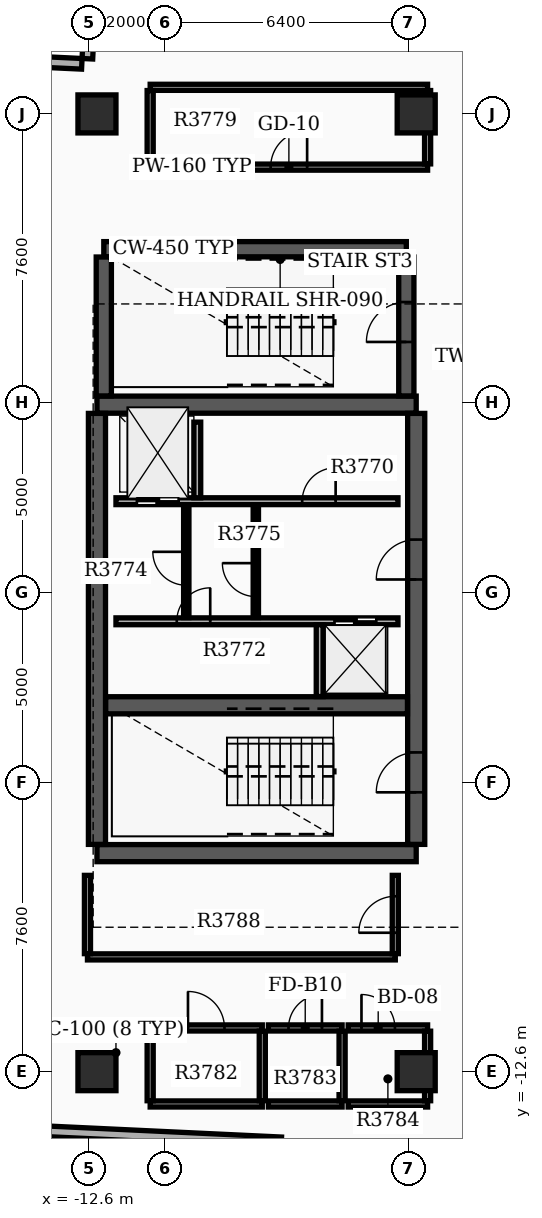
"""IFC4 building model, lengths in metres.
Left out: names, types, materials, properties, quantities, classifications, styles, units other than length and angle.
Written with IfcOpenShell. Run it as: python <this file> out.ifc"""

import sys

from ifc_helpers import new_model, si_unit, direction, frame, frame_2d, origin, origin_2d, place, context, subcontext, project, spatial, rectangle, extrude, element, fill, save


model = new_model("IFC4")
c1 = context("Model", 3, precision=1e-05, world=origin(), true_north=direction((0.0, 1.0)))
c2 = subcontext(c1, "Body", "Model", "MODEL_VIEW")
j1 = project(units=[si_unit("LENGTHUNIT", "METRE"), si_unit("PLANEANGLEUNIT", "RADIAN")], contexts=[c1])
p1 = place(None, origin())
s1 = spatial("IfcSite", under=j1, at=p1, CompositionType="ELEMENT")
p2 = place(p1, origin())
s2 = spatial("IfcBuilding", under=s1, at=p2, CompositionType="ELEMENT")
p3 = place(p2, frame((0.0, 0.0, 236.4)))
s3 = spatial("IfcBuildingStorey", under=s2, at=p3, CompositionType="ELEMENT", Elevation=236.4)
for number, where, z_axis, x_axis in (
    (1, (-12.4, -6.85, 0.0), (0.0, 0.0, 1.0), (1.0, 0.0, 0.0)),
    (2, (-12.4, 4.95, 0.0), (0.0, 0.0, 1.0), (1.0, 0.0, 0.0)),
):
    element("IfcWall", number, at=place(p3, frame(where, z_axis=z_axis, x_axis=x_axis)), inside=s3, PredefinedType="SHEAR", context=c2, shape_type="SweptSolid", body=[
        extrude(rectangle(XDim=8.4, YDim=0.45, at=frame_2d((4.2, 0.0))), origin(), (0.0, 0.0, 1.0), 3.65),
    ])
p4 = place(p3, frame((-12.4, -6.62, 0.0), z_axis=(0.0, 0.0, 1.0), x_axis=(0.0, 1.0, 0.0)))
e3 = element("IfcWall", 3, at=p4, inside=s3, PredefinedType="SHEAR", context=c2, shape_type="SweptSolid", body=[
    extrude(rectangle(XDim=11.34, YDim=0.45, at=frame_2d((5.67, 0.0))), origin(), (0.0, 0.0, 1.0), 3.65),
])
p5 = place(p3, frame((-4.0, -6.62, 0.0), z_axis=(0.0, 0.0, 1.0), x_axis=(0.0, 1.0, 0.0)))
e4 = element("IfcWall", 4, at=p5, inside=s3, PredefinedType="SHEAR", context=c2, shape_type="SweptSolid", body=[
    extrude(rectangle(XDim=11.34, YDim=0.45, at=frame_2d((5.67, 0.0))), origin(), (0.0, 0.0, 1.0), 3.65),
])
p6 = place(p5, frame((1.37, 0.0, 0.0)))
e5 = element("IfcOpeningElement", 5, at=p6, cuts=e4, PredefinedType="OPENING", context=c2, shape_type="SweptSolid", body=[
    extrude(rectangle(XDim=1.05, YDim=2.15, at=frame_2d((0.525, 1.075))), frame((0.0, 0.235, 0.0), z_axis=(0.0, -1.0, 0.0), x_axis=(1.0, 0.0, 0.0)), (0.0, 0.0, 1.0), 0.47),
])
p7 = place(p5, frame((6.97, 0.0, 0.0)))
e6 = element("IfcOpeningElement", 6, at=p7, cuts=e4, PredefinedType="OPENING", context=c2, shape_type="SweptSolid", body=[
    extrude(rectangle(XDim=1.05, YDim=2.15, at=frame_2d((0.525, 1.075))), frame((0.0, 0.235, 0.0), z_axis=(0.0, -1.0, 0.0), x_axis=(1.0, 0.0, 0.0)), (0.0, 0.0, 1.0), 0.47),
])
p8 = place(p3, frame((-12.17, -2.96, 0.0), z_axis=(0.0, 0.0, 1.0), x_axis=(1.0, 0.0, 0.0)))
e7 = element("IfcWall", 7, at=p8, inside=s3, PredefinedType="SHEAR", context=c2, shape_type="SweptSolid", body=[
    extrude(rectangle(XDim=7.94, YDim=0.45, at=frame_2d((3.97, 0.0))), origin(), (0.0, 0.0, 1.0), 3.65),
])
p9 = place(p3, frame((-12.22, 9.04, 0.0), z_axis=(0.0, 0.0, 1.0), x_axis=(1.0, 0.0, 0.0)))
e8 = element("IfcWall", 8, at=p9, inside=s3, PredefinedType="SHEAR", context=c2, shape_type="SweptSolid", body=[
    extrude(rectangle(XDim=7.96, YDim=0.4, at=frame_2d((3.98, 0.0))), origin(), (0.0, 0.0, 1.0), 3.65),
])
p10 = place(p3, frame((-12.22, 5.18, 0.0), z_axis=(0.0, 0.0, 1.0), x_axis=(0.0, 1.0, 0.0)))
e9 = element("IfcWall", 9, at=p10, inside=s3, PredefinedType="SHEAR", context=c2, shape_type="SweptSolid", body=[
    extrude(rectangle(XDim=3.655, YDim=0.4, at=frame_2d((1.828, 0.0))), origin(), (0.0, 0.0, 1.0), 3.65),
])
p11 = place(p3, frame((-4.26, 5.18, 0.0), z_axis=(0.0, 0.0, 1.0), x_axis=(0.0, 1.0, 0.0)))
e10 = element("IfcWall", 10, at=p11, inside=s3, PredefinedType="SHEAR", context=c2, shape_type="SweptSolid", body=[
    extrude(rectangle(XDim=3.655, YDim=0.4, at=frame_2d((1.828, 0.0))), origin(), (0.0, 0.0, 1.0), 3.65),
])
p12 = place(p11, frame((1.42, 0.0, 0.0)))
e11 = element("IfcOpeningElement", 11, at=p12, cuts=e10, PredefinedType="OPENING", context=c2, shape_type="SweptSolid", body=[
    extrude(rectangle(XDim=1.05, YDim=2.15, at=frame_2d((0.525, 1.075))), frame((0.0, 0.21, 0.0), z_axis=(0.0, -1.0, 0.0), x_axis=(1.0, 0.0, 0.0)), (0.0, 0.0, 1.0), 0.42),
])
for number, where, z_axis, x_axis in (
    (12, (-12.4, -12.6, 0.0), (0.0, 0.0, 1.0), (1.0, 0.0, 0.0)),
    (13, (-12.4, 12.6, 0.0), (0.0, 0.0, 1.0), (1.0, 0.0, 0.0)),
    (14, (-4.0, -12.6, 0.0), (0.0, 0.0, 1.0), (1.0, 0.0, 0.0)),
    (15, (-4.0, 12.6, 0.0), (0.0, 0.0, 1.0), (1.0, 0.0, 0.0)),
):
    element("IfcColumn", number, at=place(p3, frame(where, z_axis=z_axis, x_axis=x_axis)), inside=s3, PredefinedType="COLUMN", context=c2, shape_type="SweptSolid", body=[
        extrude(rectangle(XDim=1.0, YDim=1.0, at=origin_2d()), origin(), (0.0, 0.0, 1.0), 3.9),
    ])
p13 = place(p3, frame((-14.017, 13.976, 0.0), z_axis=(0.0, 0.0, 1.0), x_axis=(0.998883930236, -0.047232339719, 0.0)))
e16 = element("IfcWall", 16, at=p13, inside=s3, PredefinedType="STANDARD", context=c2, shape_type="SweptSolid", body=[
    extrude(rectangle(XDim=1.22, YDim=0.28, at=frame_2d((0.61, 0.0))), origin(), (0.0, 0.0, 1.0), 3.13),
])
p14 = place(p3, frame((-12.652, 14.052, 0.0), z_axis=(0.0, 0.0, 1.0), x_axis=(0.047039284441, 0.99889304018, 0.0)))
e17 = element("IfcWall", 17, at=p14, inside=s3, PredefinedType="STANDARD", context=c2, shape_type="SweptSolid", body=[
    extrude(rectangle(XDim=1.5, YDim=0.28, at=frame_2d((0.75, 0.0))), origin(), (0.0, 0.0, 1.0), 3.13),
])
p15 = place(p3, frame((-13.843, -14.164, 0.0), z_axis=(0.0, 0.0, 1.0), x_axis=(0.998889082162, -0.047123258997, 0.0)))
e18 = element("IfcWall", 18, at=p15, inside=s3, PredefinedType="STANDARD", context=c2, shape_type="SweptSolid", body=[
    extrude(rectangle(XDim=6.3, YDim=0.28, at=frame_2d((3.15, 0.0))), origin(), (0.0, 0.0, 1.0), 3.13),
])
p16 = place(p3, frame((-11.9, 2.41, 0.0), z_axis=(0.0, 0.0, 1.0), x_axis=(1.0, 0.0, 0.0)))
e19 = element("IfcWall", 19, at=p16, inside=s3, PredefinedType="SOLIDWALL", context=c2, shape_type="SweptSolid", body=[
    extrude(rectangle(XDim=7.42, YDim=0.18, at=frame_2d((3.71, 0.0))), origin(), (0.0, 0.0, 1.0), 3.12),
])
p17 = place(p16, frame((0.55, 0.0, 0.0)))
e20 = element("IfcOpeningElement", 20, at=p17, cuts=e19, PredefinedType="OPENING", context=c2, shape_type="SweptSolid", body=[
    extrude(rectangle(XDim=1.1, YDim=2.15, at=frame_2d((0.55, 1.075))), frame((0.0, 0.1, 0.0), z_axis=(0.0, -1.0, 0.0), x_axis=(1.0, 0.0, 0.0)), (0.0, 0.0, 1.0), 0.2),
])
p18 = place(p16, frame((4.9, 0.0, 0.0)))
e21 = element("IfcOpeningElement", 21, at=p18, cuts=e19, PredefinedType="OPENING", context=c2, shape_type="SweptSolid", body=[
    extrude(rectangle(XDim=0.88, YDim=2.1, at=frame_2d((0.44, 1.05))), frame((0.0, 0.1, 0.0), z_axis=(0.0, -1.0, 0.0), x_axis=(1.0, 0.0, 0.0)), (0.0, 0.0, 1.0), 0.2),
])
p19 = place(p3, frame((-11.9, -0.75, 0.0), z_axis=(0.0, 0.0, 1.0), x_axis=(1.0, 0.0, 0.0)))
e22 = element("IfcWall", 22, at=p19, inside=s3, PredefinedType="SOLIDWALL", context=c2, shape_type="SweptSolid", body=[
    extrude(rectangle(XDim=7.42, YDim=0.18, at=frame_2d((3.71, 0.0))), origin(), (0.0, 0.0, 1.0), 3.12),
])
p20 = place(p19, frame((5.75, 0.0, 0.0)))
e23 = element("IfcOpeningElement", 23, at=p20, cuts=e22, PredefinedType="OPENING", context=c2, shape_type="SweptSolid", body=[
    extrude(rectangle(XDim=1.1, YDim=2.15, at=frame_2d((0.55, 1.075))), frame((0.0, 0.1, 0.0), z_axis=(0.0, -1.0, 0.0), x_axis=(1.0, 0.0, 0.0)), (0.0, 0.0, 1.0), 0.2),
])
p21 = place(p19, frame((1.6, 0.0, 0.0)))
e24 = element("IfcOpeningElement", 24, at=p21, cuts=e22, PredefinedType="OPENING", context=c2, shape_type="SweptSolid", body=[
    extrude(rectangle(XDim=0.88, YDim=2.1, at=frame_2d((0.44, 1.05))), frame((0.0, 0.1, 0.0), z_axis=(0.0, -1.0, 0.0), x_axis=(1.0, 0.0, 0.0)), (0.0, 0.0, 1.0), 0.2),
])
p22 = place(p3, frame((-9.76, 2.5, 0.0), z_axis=(0.0, 0.0, 1.0), x_axis=(0.0, 1.0, 0.0)))
e25 = element("IfcWall", 25, at=p22, inside=s3, PredefinedType="SOLIDWALL", context=c2, shape_type="SweptSolid", body=[
    extrude(rectangle(XDim=1.99, YDim=0.18, at=frame_2d((0.995, 0.0))), origin(), (0.0, 0.0, 1.0), 3.12),
])
p23 = place(p3, frame((-6.54, -2.73, 0.0), z_axis=(0.0, 0.0, 1.0), x_axis=(0.0, 1.0, 0.0)))
e26 = element("IfcWall", 26, at=p23, inside=s3, PredefinedType="SOLIDWALL", context=c2, shape_type="SweptSolid", body=[
    extrude(rectangle(XDim=1.89, YDim=0.18, at=frame_2d((0.945, 0.0))), origin(), (0.0, 0.0, 1.0), 3.12),
])
p24 = place(p3, frame((-8.22, -0.65, 0.0), z_axis=(0.0, 0.0, 1.0), x_axis=(0.0, 1.0, 0.0)))
e27 = element("IfcWall", 27, at=p24, inside=s3, PredefinedType="SOLIDWALL", context=c2, shape_type="SweptSolid", body=[
    extrude(rectangle(XDim=2.96, YDim=0.14, at=frame_2d((1.48, 0.0))), origin(), (0.0, 0.0, 1.0), 3.12),
])
p25 = place(p24, frame((0.55, 0.0, 0.0)))
e28 = element("IfcOpeningElement", 28, at=p25, cuts=e27, PredefinedType="OPENING", context=c2, shape_type="SweptSolid", body=[
    extrude(rectangle(XDim=0.88, YDim=2.1, at=frame_2d((0.44, 1.05))), frame((0.0, 0.08, 0.0), z_axis=(0.0, -1.0, 0.0), x_axis=(1.0, 0.0, 0.0)), (0.0, 0.0, 1.0), 0.16),
])
p26 = place(p3, frame((-10.05, -0.652, 0.0), z_axis=(0.0, 0.0, 1.0), x_axis=(0.0, 1.0, 0.0)))
e29 = element("IfcWall", 29, at=p26, inside=s3, PredefinedType="PARTITIONING", context=c2, shape_type="SweptSolid", body=[
    extrude(rectangle(XDim=2.962, YDim=0.14, at=frame_2d((1.481, 0.0))), origin(), (0.0, 0.0, 1.0), 3.12),
])
p27 = place(p26, frame((0.85, 0.0, 0.0)))
e30 = element("IfcOpeningElement", 30, at=p27, cuts=e29, PredefinedType="OPENING", context=c2, shape_type="SweptSolid", body=[
    extrude(rectangle(XDim=0.88, YDim=2.1, at=frame_2d((0.44, 1.05))), frame((0.0, 0.08, 0.0), z_axis=(0.0, -1.0, 0.0), x_axis=(1.0, 0.0, 0.0)), (0.0, 0.0, 1.0), 0.16),
])
p28 = place(p3, frame((-11.0, 11.2, 0.0), z_axis=(0.0, 0.0, 1.0), x_axis=(1.0, 0.0, 0.0)))
e31 = element("IfcWall", 31, at=p28, inside=s3, PredefinedType="PARTITIONING", context=c2, shape_type="SweptSolid", body=[
    extrude(rectangle(XDim=7.3, YDim=0.16, at=frame_2d((3.65, 0.0))), origin(), (0.0, 0.0, 1.0), 3.12),
])
p29 = place(p28, frame((3.17, 0.0, 0.0)))
e32 = element("IfcOpeningElement", 32, at=p29, cuts=e31, PredefinedType="OPENING", context=c2, shape_type="SweptSolid", body=[
    extrude(rectangle(XDim=0.96, YDim=2.15, at=frame_2d((0.48, 1.075))), frame((0.0, 0.09, 0.0), z_axis=(0.0, -1.0, 0.0), x_axis=(1.0, 0.0, 0.0)), (0.0, 0.0, 1.0), 0.18),
])
p30 = place(p3, frame((-11.0, 13.3, 0.0), z_axis=(0.0, 0.0, 1.0), x_axis=(1.0, 0.0, 0.0)))
e33 = element("IfcWall", 33, at=p30, inside=s3, PredefinedType="PARTITIONING", context=c2, shape_type="SweptSolid", body=[
    extrude(rectangle(XDim=7.3, YDim=0.16, at=frame_2d((3.65, 0.0))), origin(), (0.0, 0.0, 1.0), 3.12),
])
for number, where, z_axis, x_axis in (
    (34, (-11.0, 11.285, 0.0), (0.0, 0.0, 1.0), (0.0, 1.0, 0.0)),
    (35, (-3.7, 11.285, 0.0), (0.0, 0.0, 1.0), (0.0, 1.0, 0.0)),
):
    element("IfcWall", number, at=place(p3, frame(where, z_axis=z_axis, x_axis=x_axis)), inside=s3, PredefinedType="PARTITIONING", context=c2, shape_type="SweptSolid", body=[
        extrude(rectangle(XDim=1.93, YDim=0.16, at=frame_2d((0.965, 0.0))), origin(), (0.0, 0.0, 1.0), 3.12),
    ])
p31 = place(p3, frame((-11.0, -13.45, 0.0), z_axis=(0.0, 0.0, 1.0), x_axis=(1.0, 0.0, 0.0)))
e36 = element("IfcWall", 36, at=p31, inside=s3, PredefinedType="PARTITIONING", context=c2, shape_type="SweptSolid", body=[
    extrude(rectangle(XDim=2.95, YDim=0.16, at=frame_2d((1.475, 0.0))), origin(), (0.0, 0.0, 1.0), 3.12),
])
p32 = place(p3, frame((-11.0, -11.45, 0.0), z_axis=(0.0, 0.0, 1.0), x_axis=(1.0, 0.0, 0.0)))
e37 = element("IfcWall", 37, at=p32, inside=s3, PredefinedType="PARTITIONING", context=c2, shape_type="SweptSolid", body=[
    extrude(rectangle(XDim=2.95, YDim=0.16, at=frame_2d((1.475, 0.0))), origin(), (0.0, 0.0, 1.0), 3.12),
])
p33 = place(p32, frame((0.995, 0.0, 0.0)))
e38 = element("IfcOpeningElement", 38, at=p33, cuts=e37, PredefinedType="OPENING", context=c2, shape_type="SweptSolid", body=[
    extrude(rectangle(XDim=0.96, YDim=2.15, at=frame_2d((0.48, 1.075))), frame((0.0, 0.09, 0.0), z_axis=(0.0, -1.0, 0.0), x_axis=(1.0, 0.0, 0.0)), (0.0, 0.0, 1.0), 0.18),
])
for number, where, z_axis, x_axis in (
    (39, (-11.0, -13.365, 0.0), (0.0, 0.0, 1.0), (0.0, 1.0, 0.0)),
    (40, (-8.05, -13.365, 0.0), (0.0, 0.0, 1.0), (0.0, 1.0, 0.0)),
):
    element("IfcWall", number, at=place(p3, frame(where, z_axis=z_axis, x_axis=x_axis)), inside=s3, PredefinedType="PARTITIONING", context=c2, shape_type="SweptSolid", body=[
        extrude(rectangle(XDim=1.83, YDim=0.16, at=frame_2d((0.915, 0.0))), origin(), (0.0, 0.0, 1.0), 3.12),
    ])
p34 = place(p3, frame((-7.89, -13.45, 0.0), z_axis=(0.0, 0.0, 1.0), x_axis=(1.0, 0.0, 0.0)))
e41 = element("IfcWall", 41, at=p34, inside=s3, PredefinedType="PARTITIONING", context=c2, shape_type="SweptSolid", body=[
    extrude(rectangle(XDim=1.94, YDim=0.16, at=frame_2d((0.97, 0.0))), origin(), (0.0, 0.0, 1.0), 3.12),
])
p35 = place(p3, frame((-7.89, -11.45, 0.0), z_axis=(0.0, 0.0, 1.0), x_axis=(1.0, 0.0, 0.0)))
e42 = element("IfcWall", 42, at=p35, inside=s3, PredefinedType="PARTITIONING", context=c2, shape_type="SweptSolid", body=[
    extrude(rectangle(XDim=1.94, YDim=0.16, at=frame_2d((0.97, 0.0))), origin(), (0.0, 0.0, 1.0), 3.12),
])
p36 = place(p35, frame((0.53, 0.0, 0.0)))
e43 = element("IfcOpeningElement", 43, at=p36, cuts=e42, PredefinedType="OPENING", context=c2, shape_type="SweptSolid", body=[
    extrude(rectangle(XDim=0.88, YDim=2.1, at=frame_2d((0.44, 1.05))), frame((0.0, 0.09, 0.0), z_axis=(0.0, -1.0, 0.0), x_axis=(1.0, 0.0, 0.0)), (0.0, 0.0, 1.0), 0.18),
])
p37 = place(p3, frame((-5.95, -13.365, 0.0), z_axis=(0.0, 0.0, 1.0), x_axis=(0.0, 1.0, 0.0)))
e44 = element("IfcWall", 44, at=p37, inside=s3, PredefinedType="PARTITIONING", context=c2, shape_type="SweptSolid", body=[
    extrude(rectangle(XDim=1.83, YDim=0.16, at=frame_2d((0.915, 0.0))), origin(), (0.0, 0.0, 1.0), 3.12),
])
p38 = place(p3, frame((-5.79, -13.45, 0.0), z_axis=(0.0, 0.0, 1.0), x_axis=(1.0, 0.0, 0.0)))
e45 = element("IfcWall", 45, at=p38, inside=s3, PredefinedType="PARTITIONING", context=c2, shape_type="SweptSolid", body=[
    extrude(rectangle(XDim=2.09, YDim=0.16, at=frame_2d((1.045, 0.0))), origin(), (0.0, 0.0, 1.0), 3.12),
])
p39 = place(p3, frame((-5.79, -11.45, 0.0), z_axis=(0.0, 0.0, 1.0), x_axis=(1.0, 0.0, 0.0)))
e46 = element("IfcWall", 46, at=p39, inside=s3, PredefinedType="PARTITIONING", context=c2, shape_type="SweptSolid", body=[
    extrude(rectangle(XDim=2.09, YDim=0.16, at=frame_2d((1.045, 0.0))), origin(), (0.0, 0.0, 1.0), 3.12),
])
p40 = place(p39, frame((0.35, 0.0, 0.0)))
e47 = element("IfcOpeningElement", 47, at=p40, cuts=e46, PredefinedType="OPENING", context=c2, shape_type="SweptSolid", body=[
    extrude(rectangle(XDim=0.88, YDim=2.15, at=frame_2d((0.44, 1.075))), frame((0.0, 0.09, 0.0), z_axis=(0.0, -1.0, 0.0), x_axis=(1.0, 0.0, 0.0)), (0.0, 0.0, 1.0), 0.18),
])
p41 = place(p3, frame((-3.7, -13.365, 0.0), z_axis=(0.0, 0.0, 1.0), x_axis=(0.0, 1.0, 0.0)))
e48 = element("IfcWall", 48, at=p41, inside=s3, PredefinedType="PARTITIONING", context=c2, shape_type="SweptSolid", body=[
    extrude(rectangle(XDim=1.83, YDim=0.16, at=frame_2d((0.915, 0.0))), origin(), (0.0, 0.0, 1.0), 3.12),
])
p42 = place(p3, frame((-12.65, -9.58, 0.0), z_axis=(0.0, 0.0, 1.0), x_axis=(1.0, 0.0, 0.0)))
e49 = element("IfcWall", 49, at=p42, inside=s3, PredefinedType="PARTITIONING", context=c2, shape_type="SweptSolid", body=[
    extrude(rectangle(XDim=8.1, YDim=0.16, at=frame_2d((4.05, 0.0))), origin(), (0.0, 0.0, 1.0), 3.12),
])
p43 = place(p3, frame((-12.65, -9.495, 0.0), z_axis=(0.0, 0.0, 1.0), x_axis=(0.0, 1.0, 0.0)))
e50 = element("IfcWall", 50, at=p43, inside=s3, PredefinedType="PARTITIONING", context=c2, shape_type="SweptSolid", body=[
    extrude(rectangle(XDim=2.06, YDim=0.16, at=frame_2d((1.03, 0.0))), origin(), (0.0, 0.0, 1.0), 3.12),
])
p44 = place(p3, frame((-4.55, -9.495, 0.0), z_axis=(0.0, 0.0, 1.0), x_axis=(0.0, 1.0, 0.0)))
e51 = element("IfcWall", 51, at=p44, inside=s3, PredefinedType="PARTITIONING", context=c2, shape_type="SweptSolid", body=[
    extrude(rectangle(XDim=2.06, YDim=0.16, at=frame_2d((1.03, 0.0))), origin(), (0.0, 0.0, 1.0), 3.12),
])
p45 = place(p44, frame((0.55, 0.0, 0.0)))
e52 = element("IfcOpeningElement", 52, at=p45, cuts=e51, PredefinedType="OPENING", context=c2, shape_type="SweptSolid", body=[
    extrude(rectangle(XDim=0.96, YDim=2.15, at=frame_2d((0.48, 1.075))), frame((0.0, 0.09, 0.0), z_axis=(0.0, -1.0, 0.0), x_axis=(1.0, 0.0, 0.0)), (0.0, 0.0, 1.0), 0.18),
])
p46 = place(p6, origin())
e53 = element("IfcDoor", 53, at=p46, inside=s3, OperationType="SINGLE_SWING_LEFT", PredefinedType="DOOR", context=c2, shape_type="SweptSolid", body=[
    extrude(rectangle(XDim=1.05, YDim=2.15, at=frame_2d((0.525, 1.075))), frame((0.0, 0.025, 0.0), z_axis=(0.0, -1.0, 0.0), x_axis=(1.0, 0.0, 0.0)), (0.0, 0.0, 1.0), 0.05),
])
fill(e5, e53)
p47 = place(p7, origin())
e54 = element("IfcDoor", 54, at=p47, inside=s3, OperationType="SINGLE_SWING_LEFT", PredefinedType="DOOR", context=c2, shape_type="SweptSolid", body=[
    extrude(rectangle(XDim=1.05, YDim=2.15, at=frame_2d((0.525, 1.075))), frame((0.0, 0.025, 0.0), z_axis=(0.0, -1.0, 0.0), x_axis=(1.0, 0.0, 0.0)), (0.0, 0.0, 1.0), 0.05),
])
fill(e6, e54)
p48 = place(p12, origin())
e55 = element("IfcDoor", 55, at=p48, inside=s3, OperationType="SINGLE_SWING_LEFT", PredefinedType="DOOR", context=c2, shape_type="SweptSolid", body=[
    extrude(rectangle(XDim=1.05, YDim=2.15, at=frame_2d((0.525, 1.075))), frame((0.0, 0.025, 0.0), z_axis=(0.0, -1.0, 0.0), x_axis=(1.0, 0.0, 0.0)), (0.0, 0.0, 1.0), 0.05),
])
fill(e11, e55)
p49 = place(p17, origin())
e56 = element("IfcDoor", 56, at=p49, inside=s3, OperationType="DOUBLE_DOOR_SLIDING", PredefinedType="DOOR", context=c2, shape_type="SweptSolid", body=[
    extrude(rectangle(XDim=1.1, YDim=2.15, at=frame_2d((0.55, 1.075))), frame((0.0, 0.025, 0.0), z_axis=(0.0, -1.0, 0.0), x_axis=(1.0, 0.0, 0.0)), (0.0, 0.0, 1.0), 0.05),
])
fill(e20, e56)
p50 = place(p20, origin())
e57 = element("IfcDoor", 57, at=p50, inside=s3, OperationType="DOUBLE_DOOR_SLIDING", PredefinedType="DOOR", context=c2, shape_type="SweptSolid", body=[
    extrude(rectangle(XDim=1.1, YDim=2.15, at=frame_2d((0.55, 1.075))), frame((0.0, 0.025, 0.0), z_axis=(0.0, -1.0, 0.0), x_axis=(1.0, 0.0, 0.0)), (0.0, 0.0, 1.0), 0.05),
])
fill(e23, e57)
p51 = place(p18, origin())
e58 = element("IfcDoor", 58, at=p51, inside=s3, OperationType="SINGLE_SWING_RIGHT", PredefinedType="DOOR", context=c2, shape_type="SweptSolid", body=[
    extrude(rectangle(XDim=0.88, YDim=2.1, at=frame_2d((0.44, 1.05))), frame((0.0, 0.025, 0.0), z_axis=(0.0, -1.0, 0.0), x_axis=(1.0, 0.0, 0.0)), (0.0, 0.0, 1.0), 0.05),
])
fill(e21, e58)
p52 = place(p21, origin())
e59 = element("IfcDoor", 59, at=p52, inside=s3, OperationType="SINGLE_SWING_RIGHT", PredefinedType="DOOR", context=c2, shape_type="SweptSolid", body=[
    extrude(rectangle(XDim=0.88, YDim=2.1, at=frame_2d((0.44, 1.05))), frame((0.0, 0.025, 0.0), z_axis=(0.0, -1.0, 0.0), x_axis=(1.0, 0.0, 0.0)), (0.0, 0.0, 1.0), 0.05),
])
fill(e24, e59)
p53 = place(p25, origin())
e60 = element("IfcDoor", 60, at=p53, inside=s3, OperationType="SINGLE_SWING_RIGHT", PredefinedType="DOOR", context=c2, shape_type="SweptSolid", body=[
    extrude(rectangle(XDim=0.88, YDim=2.1, at=frame_2d((0.44, 1.05))), frame((0.0, 0.025, 0.0), z_axis=(0.0, -1.0, 0.0), x_axis=(1.0, 0.0, 0.0)), (0.0, 0.0, 1.0), 0.05),
])
fill(e28, e60)
p54 = place(p27, origin())
e61 = element("IfcDoor", 61, at=p54, inside=s3, OperationType="SINGLE_SWING_RIGHT", PredefinedType="DOOR", context=c2, shape_type="SweptSolid", body=[
    extrude(rectangle(XDim=0.88, YDim=2.1, at=frame_2d((0.44, 1.05))), frame((0.0, 0.025, 0.0), z_axis=(0.0, -1.0, 0.0), x_axis=(1.0, 0.0, 0.0)), (0.0, 0.0, 1.0), 0.05),
])
fill(e30, e61)
p55 = place(p29, origin())
e62 = element("IfcDoor", 62, at=p55, inside=s3, OperationType="SINGLE_SWING_RIGHT", PredefinedType="DOOR", context=c2, shape_type="SweptSolid", body=[
    extrude(rectangle(XDim=0.96, YDim=2.15, at=frame_2d((0.48, 1.075))), frame((0.0, 0.025, 0.0), z_axis=(0.0, -1.0, 0.0), x_axis=(1.0, 0.0, 0.0)), (0.0, 0.0, 1.0), 0.05),
])
fill(e32, e62)
p56 = place(p33, origin())
e63 = element("IfcDoor", 63, at=p56, inside=s3, OperationType="SINGLE_SWING_LEFT", PredefinedType="DOOR", context=c2, shape_type="SweptSolid", body=[
    extrude(rectangle(XDim=0.96, YDim=2.15, at=frame_2d((0.48, 1.075))), frame((0.0, 0.025, 0.0), z_axis=(0.0, -1.0, 0.0), x_axis=(1.0, 0.0, 0.0)), (0.0, 0.0, 1.0), 0.05),
])
fill(e38, e63)
p57 = place(p36, origin())
e64 = element("IfcDoor", 64, at=p57, inside=s3, OperationType="SINGLE_SWING_RIGHT", PredefinedType="DOOR", context=c2, shape_type="SweptSolid", body=[
    extrude(rectangle(XDim=0.88, YDim=2.1, at=frame_2d((0.44, 1.05))), frame((0.0, 0.025, 0.0), z_axis=(0.0, -1.0, 0.0), x_axis=(1.0, 0.0, 0.0)), (0.0, 0.0, 1.0), 0.05),
])
fill(e43, e64)
p58 = place(p40, origin())
e65 = element("IfcDoor", 65, at=p58, inside=s3, OperationType="SINGLE_SWING_LEFT", PredefinedType="DOOR", context=c2, shape_type="SweptSolid", body=[
    extrude(rectangle(XDim=0.88, YDim=2.15, at=frame_2d((0.44, 1.075))), frame((0.0, 0.025, 0.0), z_axis=(0.0, -1.0, 0.0), x_axis=(1.0, 0.0, 0.0)), (0.0, 0.0, 1.0), 0.05),
])
fill(e47, e65)
p59 = place(p45, origin())
e66 = element("IfcDoor", 66, at=p59, inside=s3, OperationType="SINGLE_SWING_LEFT", PredefinedType="DOOR", context=c2, shape_type="SweptSolid", body=[
    extrude(rectangle(XDim=0.96, YDim=2.15, at=frame_2d((0.48, 1.075))), frame((0.0, 0.025, 0.0), z_axis=(0.0, -1.0, 0.0), x_axis=(1.0, 0.0, 0.0)), (0.0, 0.0, 1.0), 0.05),
])
fill(e52, e66)
save(model, sys.argv[1])
